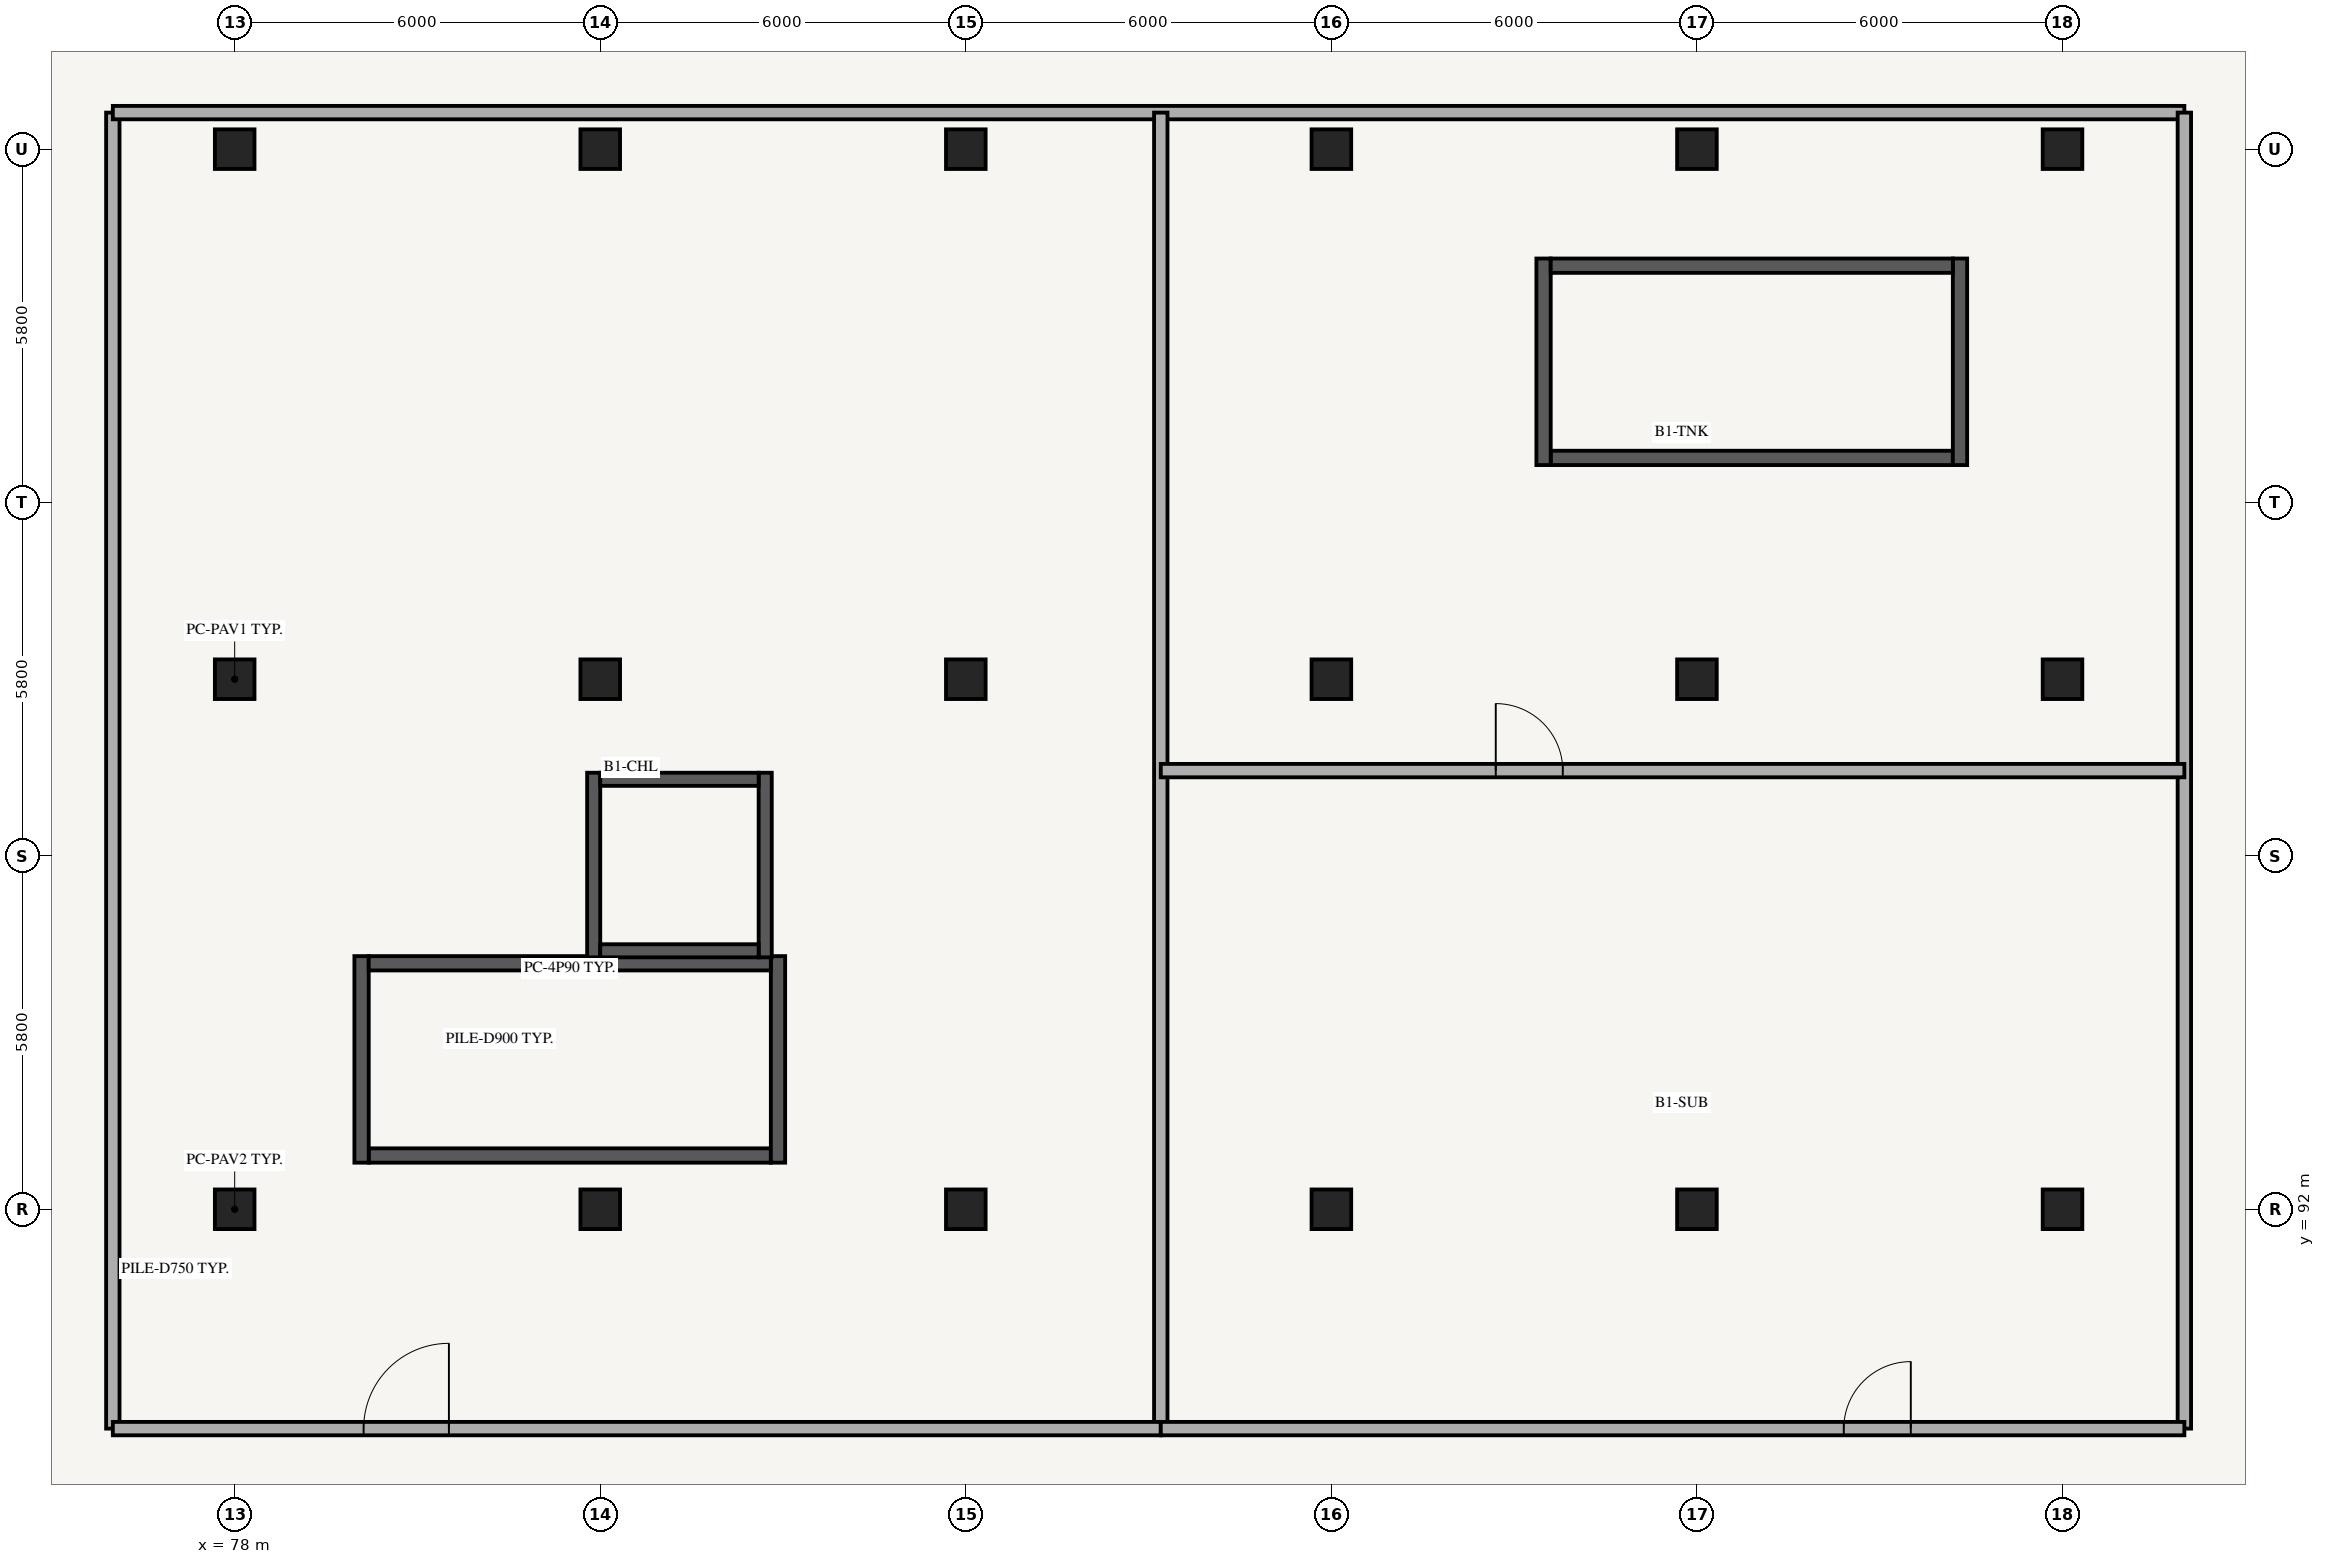
"""IFC4 building model, lengths in metres.
Left out: names, types, materials, properties, quantities, classifications, styles, units other than length and angle.
Written with IfcOpenShell. Run it as: python <this file> out.ifc"""

import sys

from ifc_helpers import new_model, si_unit, direction, frame, frame_2d, origin, origin_2d, place, context, subcontext, project, spatial, rectangle, extrude, element, fill, save


model = new_model("IFC4")
c1 = context("Model", 3, precision=1e-05, world=origin(), true_north=direction((0.0, 1.0)))
c2 = subcontext(c1, "Body", "Model", "MODEL_VIEW")
j1 = project(units=[si_unit("LENGTHUNIT", "METRE"), si_unit("PLANEANGLEUNIT", "RADIAN")], contexts=[c1])
p1 = place(None, origin())
s1 = spatial("IfcSite", under=j1, at=p1, CompositionType="ELEMENT")
p2 = place(p1, origin())
s2 = spatial("IfcBuilding", under=s1, at=p2, CompositionType="ELEMENT")
p3 = place(p2, frame((0.0, 0.0, -4.2)))
s3 = spatial("IfcBuildingStorey", under=s2, at=p3, CompositionType="ELEMENT", Elevation=-4.2)
p4 = place(p3, frame((80.2, 92.883, 0.0), z_axis=(0.0, 0.0, 1.0), x_axis=(1.0, 0.0, 0.0)))
e1 = element("IfcWall", 1, at=p4, inside=s3, PredefinedType="SHEAR", context=c2, shape_type="SweptSolid", body=[
    extrude(rectangle(XDim=6.6, YDim=0.235, at=frame_2d((3.3, 0.0))), origin(), (0.0, 0.0, 1.0), 3.92),
])
for number, where, z_axis, x_axis in (
    (2, (86.917, 92.765, 0.0), (0.0, 0.0, 1.0), (0.0, 1.0, 0.0)),
    (3, (80.083, 92.765, 0.0), (0.0, 0.0, 1.0), (0.0, 1.0, 0.0)),
):
    element("IfcWall", number, at=place(p3, frame(where, z_axis=z_axis, x_axis=x_axis)), inside=s3, PredefinedType="SHEAR", context=c2, shape_type="SweptSolid", body=[
        extrude(rectangle(XDim=3.39, YDim=0.235, at=frame_2d((1.695, 0.0))), origin(), (0.0, 0.0, 1.0), 3.92),
    ])
p5 = place(p3, frame((80.2, 96.038, 0.0), z_axis=(0.0, 0.0, 1.0), x_axis=(1.0, 0.0, 0.0)))
e4 = element("IfcWall", 4, at=p5, inside=s3, PredefinedType="SHEAR", context=c2, shape_type="SweptSolid", body=[
    extrude(rectangle(XDim=6.6, YDim=0.235, at=frame_2d((3.3, 0.0))), origin(), (0.0, 0.0, 1.0), 3.92),
])
for number, where, z_axis, x_axis in (
    (5, (83.893, 96.135, 0.0), (0.0, 0.0, 1.0), (0.0, 1.0, 0.0)),
    (6, (86.708, 96.135, 0.0), (0.0, 0.0, 1.0), (0.0, 1.0, 0.0)),
):
    element("IfcWall", number, at=place(p3, frame(where, z_axis=z_axis, x_axis=x_axis)), inside=s3, PredefinedType="SHEAR", context=c2, shape_type="SweptSolid", body=[
        extrude(rectangle(XDim=3.03, YDim=0.215, at=frame_2d((1.515, 0.0))), origin(), (0.0, 0.0, 1.0), 3.92),
    ])
for number, where, z_axis, x_axis in (
    (7, (84.0, 96.242, 0.0), (0.0, 0.0, 1.0), (1.0, 0.0, 0.0)),
    (8, (84.0, 99.058, 0.0), (0.0, 0.0, 1.0), (1.0, 0.0, 0.0)),
):
    element("IfcWall", number, at=place(p3, frame(where, z_axis=z_axis, x_axis=x_axis)), inside=s3, PredefinedType="SHEAR", context=c2, shape_type="SweptSolid", body=[
        extrude(rectangle(XDim=2.6, YDim=0.215, at=frame_2d((1.3, 0.0))), origin(), (0.0, 0.0, 1.0), 3.92),
    ])
p6 = place(p3, frame((99.6, 104.333, 0.0), z_axis=(0.0, 0.0, 1.0), x_axis=(1.0, 0.0, 0.0)))
e9 = element("IfcWall", 9, at=p6, inside=s3, PredefinedType="SHEAR", context=c2, shape_type="SweptSolid", body=[
    extrude(rectangle(XDim=6.6, YDim=0.235, at=frame_2d((3.3, 0.0))), origin(), (0.0, 0.0, 1.0), 3.92),
])
for number, where, z_axis, x_axis in (
    (10, (106.317, 104.215, 0.0), (0.0, 0.0, 1.0), (0.0, 1.0, 0.0)),
    (11, (99.482, 104.215, 0.0), (0.0, 0.0, 1.0), (0.0, 1.0, 0.0)),
):
    element("IfcWall", number, at=place(p3, frame(where, z_axis=z_axis, x_axis=x_axis)), inside=s3, PredefinedType="SHEAR", context=c2, shape_type="SweptSolid", body=[
        extrude(rectangle(XDim=3.39, YDim=0.235, at=frame_2d((1.695, 0.0))), origin(), (0.0, 0.0, 1.0), 3.92),
    ])
p7 = place(p3, frame((99.6, 107.488, 0.0), z_axis=(0.0, 0.0, 1.0), x_axis=(1.0, 0.0, 0.0)))
e12 = element("IfcWall", 12, at=p7, inside=s3, PredefinedType="SHEAR", context=c2, shape_type="SweptSolid", body=[
    extrude(rectangle(XDim=6.6, YDim=0.235, at=frame_2d((3.3, 0.0))), origin(), (0.0, 0.0, 1.0), 3.92),
])
for number, where, z_axis, x_axis in (
    (13, (78.0, 92.0, 0.0), (0.0, 0.0, 1.0), (1.0, 0.0, 0.0)),
    (14, (78.0, 100.7, 0.0), (0.0, 0.0, 1.0), (1.0, 0.0, 0.0)),
    (15, (78.0, 109.4, 0.0), (0.0, 0.0, 1.0), (1.0, 0.0, 0.0)),
    (16, (84.0, 92.0, 0.0), (0.0, 0.0, 1.0), (1.0, 0.0, 0.0)),
    (17, (84.0, 100.7, 0.0), (0.0, 0.0, 1.0), (1.0, 0.0, 0.0)),
    (18, (84.0, 109.4, 0.0), (0.0, 0.0, 1.0), (1.0, 0.0, 0.0)),
    (19, (90.0, 92.0, 0.0), (0.0, 0.0, 1.0), (1.0, 0.0, 0.0)),
    (20, (90.0, 100.7, 0.0), (0.0, 0.0, 1.0), (1.0, 0.0, 0.0)),
    (21, (90.0, 109.4, 0.0), (0.0, 0.0, 1.0), (1.0, 0.0, 0.0)),
    (22, (96.0, 92.0, 0.0), (0.0, 0.0, 1.0), (1.0, 0.0, 0.0)),
    (23, (96.0, 100.7, 0.0), (0.0, 0.0, 1.0), (1.0, 0.0, 0.0)),
    (24, (96.0, 109.4, 0.0), (0.0, 0.0, 1.0), (1.0, 0.0, 0.0)),
    (25, (102.0, 92.0, 0.0), (0.0, 0.0, 1.0), (1.0, 0.0, 0.0)),
    (26, (102.0, 100.7, 0.0), (0.0, 0.0, 1.0), (1.0, 0.0, 0.0)),
    (27, (102.0, 109.4, 0.0), (0.0, 0.0, 1.0), (1.0, 0.0, 0.0)),
    (28, (108.0, 92.0, 0.0), (0.0, 0.0, 1.0), (1.0, 0.0, 0.0)),
    (29, (108.0, 100.7, 0.0), (0.0, 0.0, 1.0), (1.0, 0.0, 0.0)),
    (30, (108.0, 109.4, 0.0), (0.0, 0.0, 1.0), (1.0, 0.0, 0.0)),
):
    element("IfcColumn", number, at=place(p3, frame(where, z_axis=z_axis, x_axis=x_axis)), inside=s3, PredefinedType="COLUMN", context=c2, shape_type="SweptSolid", body=[
        extrude(rectangle(XDim=0.65, YDim=0.65, at=origin_2d()), origin(), (0.0, 0.0, 1.0), 3.935),
    ])
p8 = place(p3, frame((76.0, 88.4, 0.0), z_axis=(0.0, 0.0, 1.0), x_axis=(0.0, 1.0, 0.0)))
e31 = element("IfcWall", 31, at=p8, inside=s3, PredefinedType="PARTITIONING", context=c2, shape_type="SweptSolid", body=[
    extrude(rectangle(XDim=21.6, YDim=0.22, at=frame_2d((10.8, 0.0))), origin(), (0.0, 0.0, 1.0), 2.85),
])
p9 = place(p3, frame((76.0, 110.0, 0.0), z_axis=(0.0, 0.0, 1.0), x_axis=(1.0, 0.0, 0.0)))
e32 = element("IfcWall", 32, at=p9, inside=s3, PredefinedType="PARTITIONING", context=c2, shape_type="SweptSolid", body=[
    extrude(rectangle(XDim=34.0, YDim=0.22, at=frame_2d((17.0, 0.0))), origin(), (0.0, 0.0, 1.0), 2.85),
])
for number, where, z_axis, x_axis in (
    (33, (110.0, 88.4, 0.0), (0.0, 0.0, 1.0), (0.0, 1.0, 0.0)),
    (34, (93.2, 88.4, 0.0), (0.0, 0.0, 1.0), (0.0, 1.0, 0.0)),
):
    element("IfcWall", number, at=place(p3, frame(where, z_axis=z_axis, x_axis=x_axis)), inside=s3, PredefinedType="PARTITIONING", context=c2, shape_type="SweptSolid", body=[
        extrude(rectangle(XDim=21.6, YDim=0.22, at=frame_2d((10.8, 0.0))), origin(), (0.0, 0.0, 1.0), 2.85),
    ])
p10 = place(p3, frame((93.2, 99.2, 0.0), z_axis=(0.0, 0.0, 1.0), x_axis=(1.0, 0.0, 0.0)))
e35 = element("IfcWall", 35, at=p10, inside=s3, PredefinedType="PARTITIONING", context=c2, shape_type="SweptSolid", body=[
    extrude(rectangle(XDim=16.8, YDim=0.22, at=frame_2d((8.4, 0.0))), origin(), (0.0, 0.0, 1.0), 2.85),
])
p11 = place(p10, frame((5.498, 0.0, 0.0)))
e36 = element("IfcOpeningElement", 36, at=p11, cuts=e35, PredefinedType="OPENING", context=c2, shape_type="SweptSolid", body=[
    extrude(rectangle(XDim=1.1, YDim=2.15, at=frame_2d((0.55, 1.075))), frame((0.0, 0.12, 0.0), z_axis=(0.0, -1.0, 0.0), x_axis=(1.0, 0.0, 0.0)), (0.0, 0.0, 1.0), 0.24),
])
p12 = place(p3, frame((76.0, 88.4, 0.0), z_axis=(0.0, 0.0, 1.0), x_axis=(1.0, 0.0, 0.0)))
e37 = element("IfcWall", 37, at=p12, inside=s3, PredefinedType="PARTITIONING", context=c2, shape_type="SweptSolid", body=[
    extrude(rectangle(XDim=17.2, YDim=0.22, at=frame_2d((8.6, 0.0))), origin(), (0.0, 0.0, 1.0), 2.85),
])
p13 = place(p12, frame((4.116, 0.0, 0.0)))
e38 = element("IfcOpeningElement", 38, at=p13, cuts=e37, PredefinedType="OPENING", context=c2, shape_type="SweptSolid", body=[
    extrude(rectangle(XDim=1.4, YDim=2.15, at=frame_2d((0.7, 1.075))), frame((0.0, 0.12, 0.0), z_axis=(0.0, -1.0, 0.0), x_axis=(1.0, 0.0, 0.0)), (0.0, 0.0, 1.0), 0.24),
])
p14 = place(p3, frame((93.2, 88.4, 0.0), z_axis=(0.0, 0.0, 1.0), x_axis=(1.0, 0.0, 0.0)))
e39 = element("IfcWall", 39, at=p14, inside=s3, PredefinedType="PARTITIONING", context=c2, shape_type="SweptSolid", body=[
    extrude(rectangle(XDim=16.8, YDim=0.22, at=frame_2d((8.4, 0.0))), origin(), (0.0, 0.0, 1.0), 2.85),
])
p15 = place(p14, frame((11.21, 0.0, 0.0)))
e40 = element("IfcOpeningElement", 40, at=p15, cuts=e39, PredefinedType="OPENING", context=c2, shape_type="SweptSolid", body=[
    extrude(rectangle(XDim=1.1, YDim=2.15, at=frame_2d((0.55, 1.075))), frame((0.0, 0.12, 0.0), z_axis=(0.0, -1.0, 0.0), x_axis=(1.0, 0.0, 0.0)), (0.0, 0.0, 1.0), 0.24),
])
p16 = place(p11, origin())
e41 = element("IfcDoor", 41, at=p16, inside=s3, OperationType="SINGLE_SWING_LEFT", PredefinedType="DOOR", context=c2, shape_type="SweptSolid", body=[
    extrude(rectangle(XDim=1.1, YDim=2.15, at=frame_2d((0.55, 1.075))), frame((0.0, 0.025, 0.0), z_axis=(0.0, -1.0, 0.0), x_axis=(1.0, 0.0, 0.0)), (0.0, 0.0, 1.0), 0.05),
])
fill(e36, e41)
p17 = place(p13, origin())
e42 = element("IfcDoor", 42, at=p17, inside=s3, OperationType="DOUBLE_DOOR_SINGLE_SWING", PredefinedType="DOOR", context=c2, shape_type="SweptSolid", body=[
    extrude(rectangle(XDim=1.4, YDim=2.15, at=frame_2d((0.7, 1.075))), frame((0.0, 0.025, 0.0), z_axis=(0.0, -1.0, 0.0), x_axis=(1.0, 0.0, 0.0)), (0.0, 0.0, 1.0), 0.05),
])
fill(e38, e42)
p18 = place(p15, origin())
e43 = element("IfcDoor", 43, at=p18, inside=s3, OperationType="SINGLE_SWING_RIGHT", PredefinedType="DOOR", context=c2, shape_type="SweptSolid", body=[
    extrude(rectangle(XDim=1.1, YDim=2.15, at=frame_2d((0.55, 1.075))), frame((0.0, 0.025, 0.0), z_axis=(0.0, -1.0, 0.0), x_axis=(1.0, 0.0, 0.0)), (0.0, 0.0, 1.0), 0.05),
])
fill(e40, e43)
save(model, sys.argv[1])
